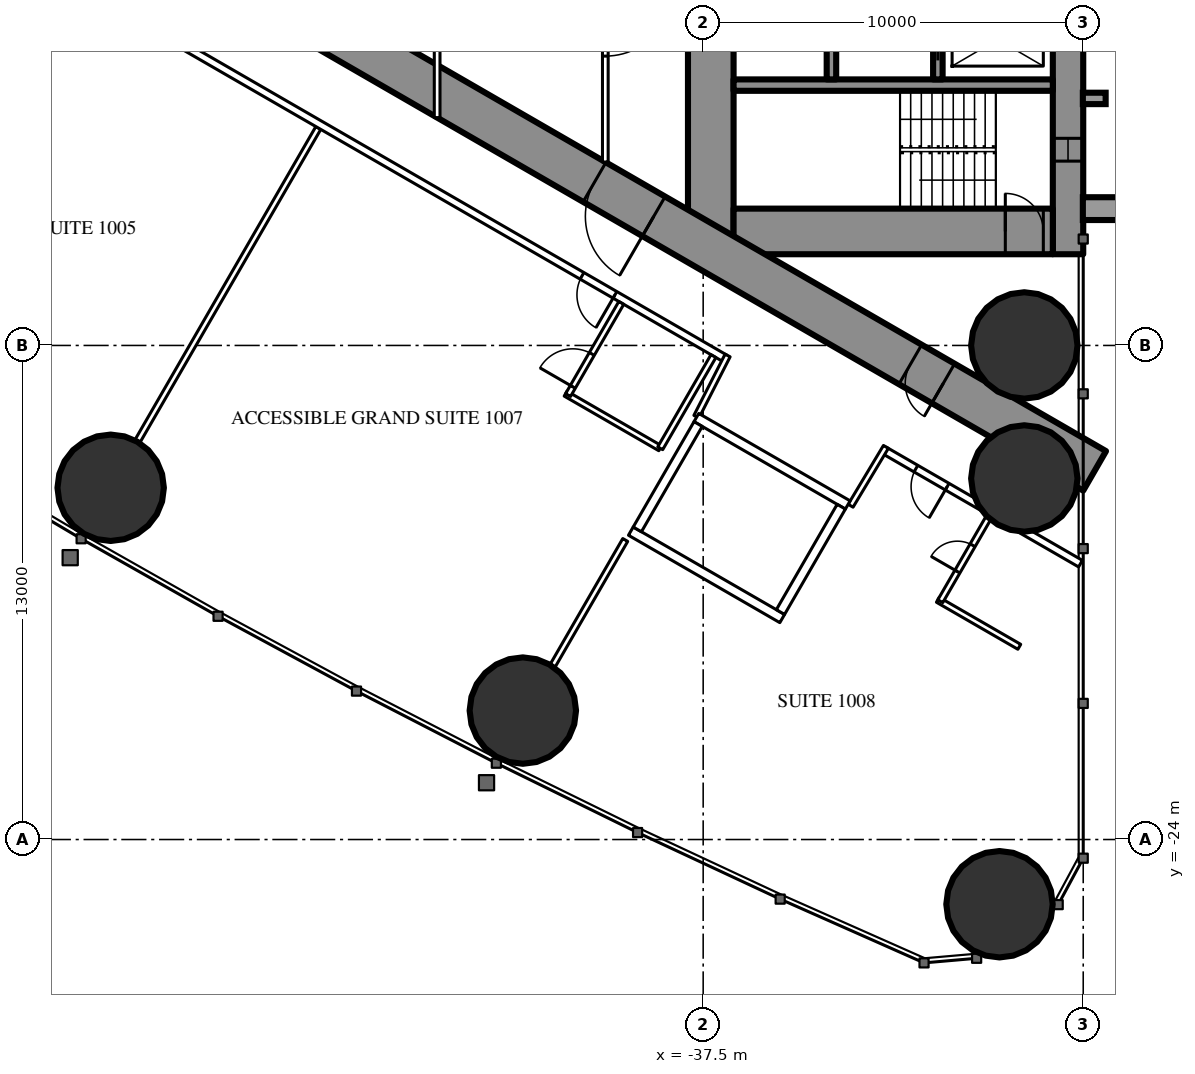
"""IFC4 building model, lengths in metres.
Left out: names, types, materials, properties, quantities, classifications, styles, units other than length and angle.
Written with IfcOpenShell. Run it as: python <this file> out.ifc"""

import sys

from ifc_helpers import new_model, si_unit, direction, frame, frame_2d, origin, origin_2d, place, context, subcontext, project, spatial, rectangle, hollow_circle, extrude, element, fill, save


model = new_model("IFC4")
c1 = context("Model", 3, precision=1e-05, world=origin(), true_north=direction((0.0, 1.0)))
c2 = subcontext(c1, "Body", "Model", "MODEL_VIEW")
j1 = project(units=[si_unit("LENGTHUNIT", "METRE"), si_unit("PLANEANGLEUNIT", "RADIAN")], contexts=[c1])
p1 = place(None, origin())
s1 = spatial("IfcSite", under=j1, at=p1, CompositionType="ELEMENT")
p2 = place(p1, origin())
s2 = spatial("IfcBuilding", under=s1, at=p2, CompositionType="ELEMENT")
p3 = place(p2, frame((0.0, 0.0, 42.5)))
s3 = spatial("IfcBuildingStorey", under=s2, at=p3, CompositionType="ELEMENT", Elevation=42.5)
for number, where, z_axis, x_axis in (
    (1, (-29.703, -25.703, 0.0), (0.0, 0.0, 1.0), (1.0, 0.0, 0.0)),
    (2, (-29.05, -11.0, 0.0), (0.0, 0.0, 1.0), (1.0, 0.0, 0.0)),
    (3, (-29.05, -14.5, 0.0), (0.0, 0.0, 1.0), (1.0, 0.0, 0.0)),
    (4, (-53.09, -14.745, 0.0), (0.0, 0.0, 1.0), (1.0, 0.0, 0.0)),
    (5, (-42.245, -20.607, 0.0), (0.0, 0.0, 1.0), (1.0, 0.0, 0.0)),
):
    element("IfcColumn", number, at=place(p3, frame(where, z_axis=z_axis, x_axis=x_axis)), inside=s3, PredefinedType="COLUMN", context=c2, shape_type="SweptSolid", body=[
        extrude(hollow_circle(Radius=1.4, WallThickness=0.12, at=origin_2d()), origin(), (0.0, 0.0, 1.0), 3.5),
    ])
p4 = place(p3, frame((-27.9, 8.6, 0.0), z_axis=(0.0, 0.0, 1.0), x_axis=(0.0, -1.0, 0.0)))
e6 = element("IfcWall", 6, at=p4, inside=s3, PredefinedType="SHEAR", context=c2, shape_type="SweptSolid", body=[
    extrude(rectangle(XDim=17.2, YDim=0.8, at=frame_2d((8.6, 0.0))), origin(), (0.0, 0.0, 1.0), 3.5),
])
p5 = place(p4, frame((2.45, 0.0, 0.6)))
e7 = element("IfcOpeningElement", 7, at=p5, cuts=e6, PredefinedType="OPENING", context=c2, shape_type="SweptSolid", body=[
    extrude(rectangle(XDim=0.6, YDim=2.1, at=frame_2d((0.3, 1.05))), frame((0.0, 0.41, 0.0), z_axis=(0.0, -1.0, 0.0), x_axis=(1.0, 0.0, 0.0)), (0.0, 0.0, 1.0), 0.82),
])
p6 = place(p4, frame((14.15, 0.0, 0.6)))
e8 = element("IfcOpeningElement", 8, at=p6, cuts=e6, PredefinedType="OPENING", context=c2, shape_type="SweptSolid", body=[
    extrude(rectangle(XDim=0.6, YDim=2.1, at=frame_2d((0.3, 1.05))), frame((0.0, 0.41, 0.0), z_axis=(0.0, -1.0, 0.0), x_axis=(1.0, 0.0, 0.0)), (0.0, 0.0, 1.0), 0.82),
])
p7 = place(p3, frame((-37.3, 8.6, 0.0), z_axis=(0.0, 0.0, 1.0), x_axis=(0.0, -1.0, 0.0)))
e9 = element("IfcWall", 9, at=p7, inside=s3, PredefinedType="SHEAR", context=c2, shape_type="SweptSolid", body=[
    extrude(rectangle(XDim=17.2, YDim=1.2, at=frame_2d((8.6, 0.0))), origin(), (0.0, 0.0, 1.0), 3.5),
])
p8 = place(p7, frame((7.7, 0.0, 0.0)))
e10 = element("IfcOpeningElement", 10, at=p8, cuts=e9, PredefinedType="OPENING", context=c2, shape_type="SweptSolid", body=[
    extrude(rectangle(XDim=1.8, YDim=2.2, at=frame_2d((0.9, 1.1))), frame((0.0, 0.61, 0.0), z_axis=(0.0, -1.0, 0.0), x_axis=(1.0, 0.0, 0.0)), (0.0, 0.0, 1.0), 1.22),
])
p9 = place(p3, frame((-28.3, -8.0, 0.0), z_axis=(0.0, 0.0, 1.0), x_axis=(-1.0, 0.0, 0.0)))
e11 = element("IfcWall", 11, at=p9, inside=s3, PredefinedType="SHEAR", context=c2, shape_type="SweptSolid", body=[
    extrude(rectangle(XDim=8.4, YDim=1.2, at=frame_2d((4.2, 0.0))), origin(), (0.0, 0.0, 1.0), 3.5),
])
p10 = place(p9, frame((0.25, 0.0, 0.0)))
e12 = element("IfcOpeningElement", 12, at=p10, cuts=e11, PredefinedType="OPENING", context=c2, shape_type="SweptSolid", body=[
    extrude(rectangle(XDim=1.0, YDim=2.2, at=frame_2d((0.5, 1.1))), frame((0.0, 0.61, 0.0), z_axis=(0.0, -1.0, 0.0), x_axis=(1.0, 0.0, 0.0)), (0.0, 0.0, 1.0), 1.22),
])
p11 = place(p3, frame((-28.3, -4.15, 0.0), z_axis=(0.0, 0.0, 1.0), x_axis=(-1.0, 0.0, 0.0)))
e13 = element("IfcWall", 13, at=p11, inside=s3, PredefinedType="SHEAR", context=c2, shape_type="SweptSolid", body=[
    extrude(rectangle(XDim=8.4, YDim=0.3, at=frame_2d((4.2, 0.0))), origin(), (0.0, 0.0, 1.0), 3.5),
])
p12 = place(p3, frame((-31.325, -1.9, 0.0), z_axis=(0.0, 0.0, 1.0), x_axis=(0.0, -1.0, 0.0)))
e14 = element("IfcWall", 14, at=p12, inside=s3, PredefinedType="SHEAR", context=c2, shape_type="SweptSolid", body=[
    extrude(rectangle(XDim=2.1, YDim=0.25, at=frame_2d((1.05, 0.0))), origin(), (0.0, 0.0, 1.0), 3.5),
])
p13 = place(p12, frame((0.5, 0.0, 0.0)))
e15 = element("IfcOpeningElement", 15, at=p13, cuts=e14, PredefinedType="OPENING", context=c2, shape_type="SweptSolid", body=[
    extrude(rectangle(XDim=1.1, YDim=2.2, at=frame_2d((0.55, 1.1))), frame((0.0, 0.135, 0.0), z_axis=(0.0, -1.0, 0.0), x_axis=(1.0, 0.0, 0.0)), (0.0, 0.0, 1.0), 0.27),
])
p14 = place(p3, frame((-34.125, -1.65, 0.0), z_axis=(0.0, 0.0, 1.0), x_axis=(0.0, -1.0, 0.0)))
e16 = element("IfcWall", 16, at=p14, inside=s3, PredefinedType="SHEAR", context=c2, shape_type="SweptSolid", body=[
    extrude(rectangle(XDim=2.35, YDim=0.25, at=frame_2d((1.175, 0.0))), origin(), (0.0, 0.0, 1.0), 3.5),
])
p15 = place(p3, frame((-27.2, -14.3, 0.0), z_axis=(0.0, 0.0, 1.0), x_axis=(-0.866024021859, 0.500002393557, 0.0)))
e17 = element("IfcWall", 17, at=p15, inside=s3, PredefinedType="SHEAR", context=c2, shape_type="SweptSolid", body=[
    extrude(rectangle(XDim=27.907, YDim=1.2, at=frame_2d((13.954, 0.0))), origin(), (0.0, 0.0, 1.0), 3.5),
])
p16 = place(p15, frame((4.6, 0.0, 0.0)))
e18 = element("IfcOpeningElement", 18, at=p16, cuts=e17, PredefinedType="OPENING", context=c2, shape_type="SweptSolid", body=[
    extrude(rectangle(XDim=1.0, YDim=2.2, at=frame_2d((0.5, 1.1))), frame((0.0, 0.61, 0.0), z_axis=(0.0, -1.0, 0.0), x_axis=(1.0, 0.0, 0.0)), (0.0, 0.0, 1.0), 1.22),
])
p17 = place(p15, frame((13.395, 0.0, 0.0)))
e19 = element("IfcOpeningElement", 19, at=p17, cuts=e17, PredefinedType="OPENING", context=c2, shape_type="SweptSolid", body=[
    extrude(rectangle(XDim=1.8, YDim=2.2, at=frame_2d((0.9, 1.1))), frame((0.0, 0.61, 0.0), z_axis=(0.0, -1.0, 0.0), x_axis=(1.0, 0.0, 0.0)), (0.0, 0.0, 1.0), 1.22),
])
p18 = place(p3, frame((-47.627, -5.278, 0.0), z_axis=(0.0, 0.0, 1.0), x_axis=(-0.500009844318, -0.86601972009, 0.0)))
e20 = element("IfcWall", 20, at=p18, inside=s3, PredefinedType="PARTITIONING", context=c2, shape_type="SweptSolid", body=[
    extrude(rectangle(XDim=9.51, YDim=0.15, at=frame_2d((4.755, 0.0))), origin(), (0.0, 0.0, 1.0), 2.25),
])
p19 = place(p3, frame((-39.551, -16.118, 0.0), z_axis=(0.0, 0.0, 1.0), x_axis=(-0.499986503906, -0.866033195618, 0.0)))
e21 = element("IfcWall", 21, at=p19, inside=s3, PredefinedType="PARTITIONING", context=c2, shape_type="SweptSolid", body=[
    extrude(rectangle(XDim=3.815, YDim=0.15, at=frame_2d((1.907, 0.0))), origin(), (0.0, 0.0, 1.0), 3.25),
])
p20 = place(p3, frame((-27.572, -16.741, 0.0), z_axis=(0.0, 0.0, 1.0), x_axis=(-0.866024464444, 0.500001626982, 0.0)))
e22 = element("IfcWall", 22, at=p20, inside=s3, PredefinedType="PARTITIONING", context=c2, shape_type="SweptSolid", body=[
    extrude(rectangle(XDim=5.955, YDim=0.2, at=frame_2d((2.978, 0.0))), origin(), (0.0, 0.0, 1.0), 3.25),
])
p21 = place(p20, frame((4.05, 0.0, 0.0)))
e23 = element("IfcOpeningElement", 23, at=p21, cuts=e22, PredefinedType="OPENING", context=c2, shape_type="SweptSolid", body=[
    extrude(rectangle(XDim=0.95, YDim=2.2, at=frame_2d((0.475, 1.1))), frame((0.0, 0.11, 0.0), z_axis=(0.0, -1.0, 0.0), x_axis=(1.0, 0.0, 0.0)), (0.0, 0.0, 1.0), 0.22),
])
p22 = place(p3, frame((-36.92, -11.344, 0.0), z_axis=(0.0, 0.0, 1.0), x_axis=(-0.866028313256, 0.499994960614, 0.0)))
e24 = element("IfcWall", 24, at=p22, inside=s3, PredefinedType="PARTITIONING", context=c2, shape_type="SweptSolid", body=[
    extrude(rectangle(XDim=22.568, YDim=0.2, at=frame_2d((11.284, 0.0))), origin(), (0.0, 0.0, 1.0), 3.25),
])
p23 = place(p22, frame((21.018, 0.0, 0.0)))
e25 = element("IfcOpeningElement", 25, at=p23, cuts=e24, PredefinedType="OPENING", context=c2, shape_type="SweptSolid", body=[
    extrude(rectangle(XDim=0.95, YDim=2.2, at=frame_2d((0.475, 1.1))), frame((0.0, 0.11, 0.0), z_axis=(0.0, -1.0, 0.0), x_axis=(1.0, 0.0, 0.0)), (0.0, 0.0, 1.0), 0.22),
])
p24 = place(p22, frame((3.35, 0.0, 0.0)))
e26 = element("IfcOpeningElement", 26, at=p24, cuts=e24, PredefinedType="OPENING", context=c2, shape_type="SweptSolid", body=[
    extrude(rectangle(XDim=1.0, YDim=2.2, at=frame_2d((0.5, 1.1))), frame((0.0, 0.11, 0.0), z_axis=(0.0, -1.0, 0.0), x_axis=(1.0, 0.0, 0.0)), (0.0, 0.0, 1.0), 0.22),
])
p25 = place(p3, frame((-36.857, -11.265, 0.0), z_axis=(0.0, 0.0, 1.0), x_axis=(-0.454225294761, -0.890886851176, 0.0)))
e27 = element("IfcWall", 27, at=p25, inside=s3, PredefinedType="PARTITIONING", context=c2, shape_type="SweptSolid", body=[
    extrude(rectangle(XDim=1.807, YDim=0.15, at=frame_2d((0.904, 0.0))), origin(), (0.0, 0.0, 1.0), 3.25),
])
p26 = place(p3, frame((-33.621, -15.218, 0.0), z_axis=(0.0, 0.0, 1.0), x_axis=(0.514336634837, 0.857588377991, 0.0)))
e28 = element("IfcWall", 28, at=p26, inside=s3, PredefinedType="PARTITIONING", context=c2, shape_type="SweptSolid", body=[
    extrude(rectangle(XDim=1.805, YDim=0.15, at=frame_2d((0.903, 0.0))), origin(), (0.0, 0.0, 1.0), 3.25),
])
p27 = place(p3, frame((-38.63, -13.705, 0.0), z_axis=(0.0, 0.0, 1.0), x_axis=(-0.866018712932, 0.500011588718, 0.0)))
e29 = element("IfcWall", 29, at=p27, inside=s3, PredefinedType="PARTITIONING", context=c2, shape_type="SweptSolid", body=[
    extrude(rectangle(XDim=2.875, YDim=0.15, at=frame_2d((1.438, 0.0))), origin(), (0.0, 0.0, 1.0), 3.25),
])
p28 = place(p3, frame((-39.655, -9.88, 0.0), z_axis=(0.0, 0.0, 1.0), x_axis=(-0.500049511043, -0.865996816683, 0.0)))
e30 = element("IfcWall", 30, at=p28, inside=s3, PredefinedType="PARTITIONING", context=c2, shape_type="SweptSolid", body=[
    extrude(rectangle(XDim=2.8, YDim=0.15, at=frame_2d((1.4, 0.0))), origin(), (0.0, 0.0, 1.0), 3.25),
])
p29 = place(p28, frame((1.55, 0.0, 0.0)))
e31 = element("IfcOpeningElement", 31, at=p29, cuts=e30, PredefinedType="OPENING", context=c2, shape_type="SweptSolid", body=[
    extrude(rectangle(XDim=1.0, YDim=2.2, at=frame_2d((0.5, 1.1))), frame((0.0, 0.085, 0.0), z_axis=(0.0, -1.0, 0.0), x_axis=(1.0, 0.0, 0.0)), (0.0, 0.0, 1.0), 0.17),
])
p30 = place(p3, frame((-37.23, -11.281, 0.0), z_axis=(0.0, 0.0, 1.0), x_axis=(-0.500049511043, -0.865996816683, 0.0)))
e32 = element("IfcWall", 32, at=p30, inside=s3, PredefinedType="PARTITIONING", context=c2, shape_type="SweptSolid", body=[
    extrude(rectangle(XDim=2.8, YDim=0.15, at=frame_2d((1.4, 0.0))), origin(), (0.0, 0.0, 1.0), 3.25),
])
p31 = place(p3, frame((-29.182, -18.929, 0.0), z_axis=(0.0, 0.0, 1.0), x_axis=(-0.866006523861, 0.500032699561, 0.0)))
e33 = element("IfcWall", 33, at=p31, inside=s3, PredefinedType="PARTITIONING", context=c2, shape_type="SweptSolid", body=[
    extrude(rectangle(XDim=2.475, YDim=0.15, at=frame_2d((1.237, 0.0))), origin(), (0.0, 0.0, 1.0), 3.25),
])
p32 = place(p3, frame((-29.96, -15.478, 0.0), z_axis=(0.0, 0.0, 1.0), x_axis=(-0.500006934395, -0.866021400173, 0.0)))
e34 = element("IfcWall", 34, at=p32, inside=s3, PredefinedType="PARTITIONING", context=c2, shape_type="SweptSolid", body=[
    extrude(rectangle(XDim=2.6, YDim=0.15, at=frame_2d((1.3, 0.0))), origin(), (0.0, 0.0, 1.0), 3.25),
])
p33 = place(p32, frame((0.9, 0.0, 0.0)))
e35 = element("IfcOpeningElement", 35, at=p33, cuts=e34, PredefinedType="OPENING", context=c2, shape_type="SweptSolid", body=[
    extrude(rectangle(XDim=0.8, YDim=2.2, at=frame_2d((0.4, 1.1))), frame((0.0, 0.085, 0.0), z_axis=(0.0, -1.0, 0.0), x_axis=(1.0, 0.0, 0.0)), (0.0, 0.0, 1.0), 0.17),
])
p34 = place(p3, frame((-40.075, 1.2, 0.0), z_axis=(0.0, 0.0, 1.0), x_axis=(0.0, -1.0, 0.0)))
e36 = element("IfcWall", 36, at=p34, inside=s3, PredefinedType="PARTITIONING", context=c2, shape_type="SweptSolid", body=[
    extrude(rectangle(XDim=7.374, YDim=0.15, at=frame_2d((3.687, 0.0))), origin(), (0.0, 0.0, 1.0), 3.25),
])
p35 = place(p34, frame((2.787, 0.0, 0.0)))
e37 = element("IfcOpeningElement", 37, at=p35, cuts=e36, PredefinedType="OPENING", context=c2, shape_type="SweptSolid", body=[
    extrude(rectangle(XDim=1.8, YDim=2.2, at=frame_2d((0.9, 1.1))), frame((0.0, 0.085, 0.0), z_axis=(0.0, -1.0, 0.0), x_axis=(1.0, 0.0, 0.0)), (0.0, 0.0, 1.0), 0.17),
])
p36 = place(p3, frame((-44.5, 5.005, 0.0), z_axis=(0.0, 0.0, 1.0), x_axis=(0.0, -1.0, 0.0)))
e38 = element("IfcWall", 38, at=p36, inside=s3, PredefinedType="PARTITIONING", context=c2, shape_type="SweptSolid", body=[
    extrude(rectangle(XDim=10.009, YDim=0.15, at=frame_2d((5.005, 0.0))), origin(), (0.0, 0.0, 1.0), 2.45),
])
p37 = place(p36, frame((4.505, 0.0, 0.0)))
e39 = element("IfcOpeningElement", 39, at=p37, cuts=e38, PredefinedType="OPENING", context=c2, shape_type="SweptSolid", body=[
    extrude(rectangle(XDim=1.0, YDim=2.2, at=frame_2d((0.5, 1.1))), frame((0.0, 0.085, 0.0), z_axis=(0.0, -1.0, 0.0), x_axis=(1.0, 0.0, 0.0)), (0.0, 0.0, 1.0), 0.17),
])
p38 = place(p3, frame((-33.696, -15.197, 0.0), z_axis=(0.0, 0.0, 1.0), x_axis=(-0.865976953817, 0.500083908417, 0.0)))
e40 = element("IfcWall", 40, at=p38, inside=s3, PredefinedType="PARTITIONING", context=c2, shape_type="SweptSolid", body=[
    extrude(rectangle(XDim=4.599, YDim=0.25, at=frame_2d((2.3, 0.0))), origin(), (0.0, 0.0, 1.0), 3.25),
])
p39 = place(p3, frame((-35.42, -18.186, 0.0), z_axis=(0.0, 0.0, 1.0), x_axis=(-0.865990227814, 0.50006092162, 0.0)))
e41 = element("IfcWall", 41, at=p39, inside=s3, PredefinedType="PARTITIONING", context=c2, shape_type="SweptSolid", body=[
    extrude(rectangle(XDim=4.6, YDim=0.25, at=frame_2d((2.3, 0.0))), origin(), (0.0, 0.0, 1.0), 3.25),
])
p40 = place(p3, frame((-33.866, -15.243, 0.0), z_axis=(0.0, 0.0, 1.0), x_axis=(-0.499929347863, -0.866066190972, 0.0)))
e42 = element("IfcWall", 42, at=p40, inside=s3, PredefinedType="PARTITIONING", context=c2, shape_type="SweptSolid", body=[
    extrude(rectangle(XDim=3.201, YDim=0.25, at=frame_2d((1.6, 0.0))), origin(), (0.0, 0.0, 1.0), 3.25),
])
p41 = place(p3, frame((-37.633, -13.068, 0.0), z_axis=(0.0, 0.0, 1.0), x_axis=(-0.499872130319, -0.866099216793, 0.0)))
e43 = element("IfcWall", 43, at=p41, inside=s3, PredefinedType="PARTITIONING", context=c2, shape_type="SweptSolid", body=[
    extrude(rectangle(XDim=3.2, YDim=0.25, at=frame_2d((1.6, 0.0))), origin(), (0.0, 0.0, 1.0), 3.25),
])
p42 = place(p29, origin())
e44 = element("IfcDoor", 44, at=p42, inside=s3, OperationType="SINGLE_SWING_RIGHT", PredefinedType="DOOR", context=c2, shape_type="SweptSolid", body=[
    extrude(rectangle(XDim=1.0, YDim=2.2, at=frame_2d((0.5, 1.1))), frame((0.0, 0.025, 0.0), z_axis=(0.0, -1.0, 0.0), x_axis=(1.0, 0.0, 0.0)), (0.0, 0.0, 1.0), 0.05),
])
fill(e31, e44)
p43 = place(p24, origin())
e45 = element("IfcDoor", 45, at=p43, inside=s3, OperationType="SINGLE_SWING_LEFT", PredefinedType="DOOR", context=c2, shape_type="SweptSolid", body=[
    extrude(rectangle(XDim=1.0, YDim=2.2, at=frame_2d((0.5, 1.1))), frame((0.0, 0.025, 0.0), z_axis=(0.0, -1.0, 0.0), x_axis=(1.0, 0.0, 0.0)), (0.0, 0.0, 1.0), 0.05),
])
fill(e26, e45)
p44 = place(p33, origin())
e46 = element("IfcDoor", 46, at=p44, inside=s3, OperationType="SINGLE_SWING_RIGHT", PredefinedType="DOOR", context=c2, shape_type="SweptSolid", body=[
    extrude(rectangle(XDim=0.8, YDim=2.2, at=frame_2d((0.4, 1.1))), frame((0.0, 0.025, 0.0), z_axis=(0.0, -1.0, 0.0), x_axis=(1.0, 0.0, 0.0)), (0.0, 0.0, 1.0), 0.05),
])
fill(e35, e46)
p45 = place(p21, origin())
e47 = element("IfcDoor", 47, at=p45, inside=s3, OperationType="SINGLE_SWING_LEFT", PredefinedType="DOOR", context=c2, shape_type="SweptSolid", body=[
    extrude(rectangle(XDim=0.95, YDim=2.2, at=frame_2d((0.475, 1.1))), frame((0.0, 0.025, 0.0), z_axis=(0.0, -1.0, 0.0), x_axis=(1.0, 0.0, 0.0)), (0.0, 0.0, 1.0), 0.05),
])
fill(e23, e47)
p46 = place(p35, origin())
e48 = element("IfcDoor", 48, at=p46, inside=s3, OperationType="DOUBLE_DOOR_SINGLE_SWING", PredefinedType="DOOR", context=c2, shape_type="SweptSolid", body=[
    extrude(rectangle(XDim=1.8, YDim=2.2, at=frame_2d((0.9, 1.1))), frame((0.0, 0.025, 0.0), z_axis=(0.0, -1.0, 0.0), x_axis=(1.0, 0.0, 0.0)), (0.0, 0.0, 1.0), 0.05),
])
fill(e37, e48)
p47 = place(p16, origin())
e49 = element("IfcDoor", 49, at=p47, inside=s3, OperationType="SINGLE_SWING_LEFT", PredefinedType="DOOR", context=c2, shape_type="SweptSolid", body=[
    extrude(rectangle(XDim=1.0, YDim=2.2, at=frame_2d((0.5, 1.1))), frame((0.0, 0.025, 0.0), z_axis=(0.0, -1.0, 0.0), x_axis=(1.0, 0.0, 0.0)), (0.0, 0.0, 1.0), 0.05),
])
fill(e18, e49)
p48 = place(p17, origin())
e50 = element("IfcDoor", 50, at=p48, inside=s3, OperationType="DOUBLE_DOOR_SINGLE_SWING", PredefinedType="DOOR", context=c2, shape_type="SweptSolid", body=[
    extrude(rectangle(XDim=1.8, YDim=2.2, at=frame_2d((0.9, 1.1))), frame((0.0, 0.025, 0.0), z_axis=(0.0, -1.0, 0.0), x_axis=(1.0, 0.0, 0.0)), (0.0, 0.0, 1.0), 0.05),
])
fill(e19, e50)
p49 = place(p10, origin())
e51 = element("IfcDoor", 51, at=p49, inside=s3, OperationType="SINGLE_SWING_RIGHT", PredefinedType="DOOR", context=c2, shape_type="SweptSolid", body=[
    extrude(rectangle(XDim=1.0, YDim=2.2, at=frame_2d((0.5, 1.1))), frame((0.0, 0.025, 0.0), z_axis=(0.0, -1.0, 0.0), x_axis=(1.0, 0.0, 0.0)), (0.0, 0.0, 1.0), 0.05),
])
fill(e12, e51)
p50 = place(p13, origin())
e52 = element("IfcDoor", 52, at=p50, inside=s3, OperationType="SLIDING_TO_LEFT", PredefinedType="USERDEFINED", context=c2, shape_type="SweptSolid", body=[
    extrude(rectangle(XDim=1.1, YDim=2.2, at=frame_2d((0.55, 1.1))), frame((0.0, 0.025, 0.0), z_axis=(0.0, -1.0, 0.0), x_axis=(1.0, 0.0, 0.0)), (0.0, 0.0, 1.0), 0.05),
])
fill(e15, e52)
p51 = place(p6, origin())
e53 = element("IfcWindow", 53, at=p51, inside=s3, PartitioningType="SINGLE_PANEL", PredefinedType="WINDOW", context=c2, shape_type="SweptSolid", body=[
    extrude(rectangle(XDim=0.6, YDim=2.1, at=frame_2d((0.3, 1.05))), frame((0.0, 0.03, 0.0), z_axis=(0.0, -1.0, 0.0), x_axis=(1.0, 0.0, 0.0)), (0.0, 0.0, 1.0), 0.06),
])
fill(e8, e53)
save(model, sys.argv[1])
